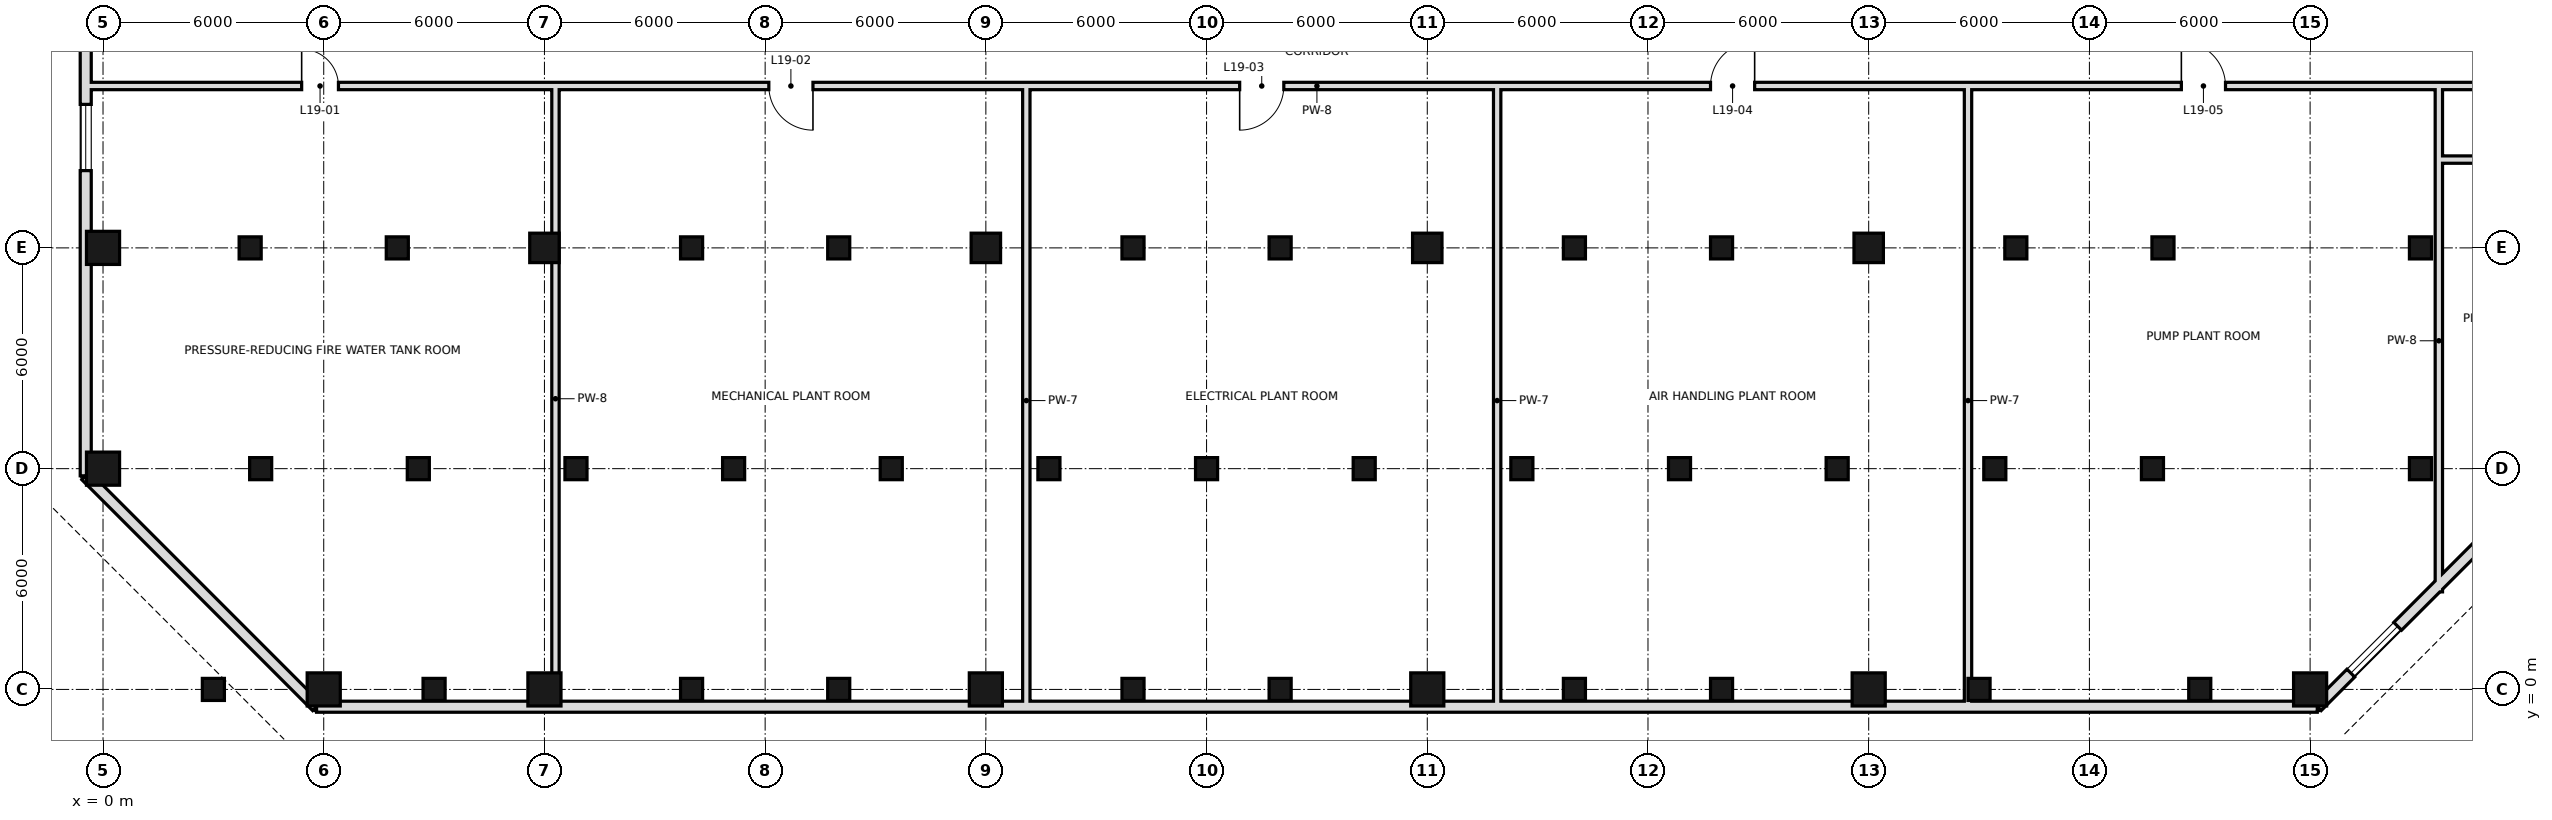
"""IFC4 building model, lengths in metres.
Left out: names, types, materials, properties, quantities, classifications, styles, units other than length and angle.
Written with IfcOpenShell. Run it as: python <this file> out.ifc"""

import sys

from ifc_helpers import new_model, si_unit, direction, frame, frame_2d, origin, origin_2d, place, context, subcontext, project, spatial, rectangle, hollow_rectangle, extrude, element, fill, save


model = new_model("IFC4")
c1 = context("Model", 3, precision=1e-05, world=origin(), true_north=direction((0.0, 1.0)))
c2 = subcontext(c1, "Body", "Model", "MODEL_VIEW")
j1 = project(units=[si_unit("LENGTHUNIT", "METRE"), si_unit("PLANEANGLEUNIT", "RADIAN")], contexts=[c1])
p1 = place(None, origin())
s1 = spatial("IfcSite", under=j1, at=p1, CompositionType="ELEMENT")
p2 = place(p1, origin())
s2 = spatial("IfcBuilding", under=s1, at=p2, CompositionType="ELEMENT")
p3 = place(p2, frame((0.0, 0.0, 90.2)))
s3 = spatial("IfcBuildingStorey", under=s2, at=p3, CompositionType="ELEMENT", Elevation=90.2)
p4 = place(p3, frame((0.0, 6.0, 0.0), z_axis=(0.0, 0.0, 1.0), x_axis=(1.0, 0.0, 0.0)))
e1 = element("IfcColumn", 1, at=p4, inside=s3, PredefinedType="COLUMN", context=c2, shape_type="SweptSolid", body=[
    extrude(hollow_rectangle(XDim=0.9, YDim=0.9, WallThickness=0.045, at=origin_2d()), origin(), (0.0, 0.0, 1.0), 5.7),
])
for number, where, z_axis, x_axis in (
    (2, (0.0, 12.0, 0.0), (0.0, 0.0, 1.0), (1.0, 0.0, 0.0)),
    (3, (6.0, 0.0, 0.0), (0.0, 0.0, 1.0), (1.0, 0.0, 0.0)),
    (4, (12.0, 0.0, 0.0), (0.0, 0.0, 1.0), (1.0, 0.0, 0.0)),
):
    element("IfcColumn", number, at=place(p3, frame(where, z_axis=z_axis, x_axis=x_axis)), inside=s3, PredefinedType="COLUMN", context=c2, shape_type="SweptSolid", body=[
        extrude(hollow_rectangle(XDim=0.9, YDim=0.9, WallThickness=0.045, at=origin_2d()), origin(), (0.0, 0.0, 1.0), 6.0),
    ])
p5 = place(p3, frame((12.0, 12.0, 0.0), z_axis=(0.0, 0.0, 1.0), x_axis=(1.0, 0.0, 0.0)))
e5 = element("IfcColumn", 5, at=p5, inside=s3, PredefinedType="COLUMN", context=c2, shape_type="SweptSolid", body=[
    extrude(hollow_rectangle(XDim=0.8, YDim=0.8, WallThickness=0.04, at=origin_2d()), origin(), (0.0, 0.0, 1.0), 6.0),
])
p6 = place(p3, frame((24.0, 0.0, 0.0), z_axis=(0.0, 0.0, 1.0), x_axis=(1.0, 0.0, 0.0)))
e6 = element("IfcColumn", 6, at=p6, inside=s3, PredefinedType="COLUMN", context=c2, shape_type="SweptSolid", body=[
    extrude(hollow_rectangle(XDim=0.9, YDim=0.9, WallThickness=0.045, at=origin_2d()), origin(), (0.0, 0.0, 1.0), 6.0),
])
p7 = place(p3, frame((24.0, 12.0, 0.0), z_axis=(0.0, 0.0, 1.0), x_axis=(1.0, 0.0, 0.0)))
e7 = element("IfcColumn", 7, at=p7, inside=s3, PredefinedType="COLUMN", context=c2, shape_type="SweptSolid", body=[
    extrude(hollow_rectangle(XDim=0.8, YDim=0.8, WallThickness=0.04, at=origin_2d()), origin(), (0.0, 0.0, 1.0), 6.0),
])
p8 = place(p3, frame((36.0, 0.0, 0.0), z_axis=(0.0, 0.0, 1.0), x_axis=(1.0, 0.0, 0.0)))
e8 = element("IfcColumn", 8, at=p8, inside=s3, PredefinedType="COLUMN", context=c2, shape_type="SweptSolid", body=[
    extrude(hollow_rectangle(XDim=0.9, YDim=0.9, WallThickness=0.045, at=origin_2d()), origin(), (0.0, 0.0, 1.0), 6.0),
])
p9 = place(p3, frame((36.0, 12.0, 0.0), z_axis=(0.0, 0.0, 1.0), x_axis=(1.0, 0.0, 0.0)))
e9 = element("IfcColumn", 9, at=p9, inside=s3, PredefinedType="COLUMN", context=c2, shape_type="SweptSolid", body=[
    extrude(hollow_rectangle(XDim=0.8, YDim=0.8, WallThickness=0.04, at=origin_2d()), origin(), (0.0, 0.0, 1.0), 6.0),
])
p10 = place(p3, frame((48.0, 0.0, 0.0), z_axis=(0.0, 0.0, 1.0), x_axis=(1.0, 0.0, 0.0)))
e10 = element("IfcColumn", 10, at=p10, inside=s3, PredefinedType="COLUMN", context=c2, shape_type="SweptSolid", body=[
    extrude(hollow_rectangle(XDim=0.9, YDim=0.9, WallThickness=0.045, at=origin_2d()), origin(), (0.0, 0.0, 1.0), 6.0),
])
p11 = place(p3, frame((48.0, 12.0, 0.0), z_axis=(0.0, 0.0, 1.0), x_axis=(1.0, 0.0, 0.0)))
e11 = element("IfcColumn", 11, at=p11, inside=s3, PredefinedType="COLUMN", context=c2, shape_type="SweptSolid", body=[
    extrude(hollow_rectangle(XDim=0.8, YDim=0.8, WallThickness=0.04, at=origin_2d()), origin(), (0.0, 0.0, 1.0), 6.0),
])
p12 = place(p3, frame((60.0, 0.0, 0.0), z_axis=(0.0, 0.0, 1.0), x_axis=(1.0, 0.0, 0.0)))
e12 = element("IfcColumn", 12, at=p12, inside=s3, PredefinedType="COLUMN", context=c2, shape_type="SweptSolid", body=[
    extrude(hollow_rectangle(XDim=0.9, YDim=0.9, WallThickness=0.045, at=origin_2d()), origin(), (0.0, 0.0, 1.0), 6.0),
])
for number, where, z_axis, x_axis in (
    (13, (3.0, 0.0, 1.2), (0.0, 0.0, 1.0), (1.0, 0.0, 0.0)),
    (14, (9.0, 0.0, 1.2), (0.0, 0.0, 1.0), (1.0, 0.0, 0.0)),
    (15, (16.0, 0.0, 1.2), (0.0, 0.0, 1.0), (1.0, 0.0, 0.0)),
    (16, (20.0, 0.0, 1.2), (0.0, 0.0, 1.0), (1.0, 0.0, 0.0)),
    (17, (28.0, 0.0, 1.2), (0.0, 0.0, 1.0), (1.0, 0.0, 0.0)),
    (18, (32.0, 0.0, 1.2), (0.0, 0.0, 1.0), (1.0, 0.0, 0.0)),
    (19, (40.0, 0.0, 1.2), (0.0, 0.0, 1.0), (1.0, 0.0, 0.0)),
    (20, (44.0, 0.0, 1.2), (0.0, 0.0, 1.0), (1.0, 0.0, 0.0)),
    (21, (51.0, 0.0, 1.2), (0.0, 0.0, 1.0), (1.0, 0.0, 0.0)),
    (22, (57.0, 0.0, 1.2), (0.0, 0.0, 1.0), (1.0, 0.0, 0.0)),
    (23, (4.286, 6.0, 1.2), (0.0, 0.0, 1.0), (1.0, 0.0, 0.0)),
    (24, (8.572, 6.0, 1.2), (0.0, 0.0, 1.0), (1.0, 0.0, 0.0)),
    (25, (12.857, 6.0, 1.2), (0.0, 0.0, 1.0), (1.0, 0.0, 0.0)),
    (26, (17.143, 6.0, 1.2), (0.0, 0.0, 1.0), (1.0, 0.0, 0.0)),
    (27, (21.428, 6.0, 1.2), (0.0, 0.0, 1.0), (1.0, 0.0, 0.0)),
    (28, (25.714, 6.0, 1.2), (0.0, 0.0, 1.0), (1.0, 0.0, 0.0)),
    (29, (30.0, 6.0, 1.2), (0.0, 0.0, 1.0), (1.0, 0.0, 0.0)),
    (30, (34.286, 6.0, 1.2), (0.0, 0.0, 1.0), (1.0, 0.0, 0.0)),
    (31, (38.572, 6.0, 1.2), (0.0, 0.0, 1.0), (1.0, 0.0, 0.0)),
    (32, (42.857, 6.0, 1.2), (0.0, 0.0, 1.0), (1.0, 0.0, 0.0)),
    (33, (47.143, 6.0, 1.2), (0.0, 0.0, 1.0), (1.0, 0.0, 0.0)),
    (34, (51.428, 6.0, 1.2), (0.0, 0.0, 1.0), (1.0, 0.0, 0.0)),
    (35, (55.714, 6.0, 1.2), (0.0, 0.0, 1.0), (1.0, 0.0, 0.0)),
    (36, (63.0, 6.0, 1.2), (0.0, 0.0, 1.0), (1.0, 0.0, 0.0)),
    (37, (4.0, 12.0, 1.2), (0.0, 0.0, 1.0), (1.0, 0.0, 0.0)),
    (38, (8.0, 12.0, 1.2), (0.0, 0.0, 1.0), (1.0, 0.0, 0.0)),
    (39, (16.0, 12.0, 1.2), (0.0, 0.0, 1.0), (1.0, 0.0, 0.0)),
    (40, (20.0, 12.0, 1.2), (0.0, 0.0, 1.0), (1.0, 0.0, 0.0)),
    (41, (28.0, 12.0, 1.2), (0.0, 0.0, 1.0), (1.0, 0.0, 0.0)),
    (42, (32.0, 12.0, 1.2), (0.0, 0.0, 1.0), (1.0, 0.0, 0.0)),
    (43, (40.0, 12.0, 1.2), (0.0, 0.0, 1.0), (1.0, 0.0, 0.0)),
    (44, (44.0, 12.0, 1.2), (0.0, 0.0, 1.0), (1.0, 0.0, 0.0)),
    (45, (52.0, 12.0, 1.2), (0.0, 0.0, 1.0), (1.0, 0.0, 0.0)),
    (46, (56.0, 12.0, 1.2), (0.0, 0.0, 1.0), (1.0, 0.0, 0.0)),
    (47, (63.0, 12.0, 1.2), (0.0, 0.0, 1.0), (1.0, 0.0, 0.0)),
):
    element("IfcColumn", number, at=place(p3, frame(where, z_axis=z_axis, x_axis=x_axis)), inside=s3, PredefinedType="COLUMN", context=c2, shape_type="SweptSolid", body=[
        extrude(hollow_rectangle(XDim=0.6, YDim=0.6, WallThickness=0.04, at=origin_2d()), origin(), (0.0, 0.0, 1.0), 3.3),
    ])
p13 = place(p3, frame((5.805, -0.47, 0.0), z_axis=(0.0, 0.0, 1.0), x_axis=(1.0, 0.0, 0.0)))
e48 = element("IfcWall", 48, at=p13, inside=s3, PredefinedType="SOLIDWALL", context=c2, shape_type="SweptSolid", body=[
    extrude(rectangle(XDim=54.389, YDim=0.3, at=frame_2d((27.195, 0.0))), origin(), (0.0, 0.0, 1.0), 5.7),
])
p14 = place(p3, frame((60.195, -0.47, 0.0), z_axis=(0.0, 0.0, 1.0), x_axis=(0.707106781187, 0.707106781187, 0.0)))
e49 = element("IfcWall", 49, at=p14, inside=s3, PredefinedType="SOLIDWALL", context=c2, shape_type="SweptSolid", body=[
    extrude(rectangle(XDim=8.875, YDim=0.3, at=frame_2d((4.438, 0.0))), origin(), (0.0, 0.0, 1.0), 5.7),
])
p15 = place(p14, frame((1.292, 0.0, 0.9)))
e50 = element("IfcOpeningElement", 50, at=p15, cuts=e49, PredefinedType="OPENING", context=c2, shape_type="SweptSolid", body=[
    extrude(rectangle(XDim=1.8, YDim=1.5, at=frame_2d((0.9, 0.75))), frame((0.0, 0.16, 0.0), z_axis=(0.0, -1.0, 0.0), x_axis=(1.0, 0.0, 0.0)), (0.0, 0.0, 1.0), 0.32),
])
p16 = place(p3, frame((-0.47, 42.195, 0.0), z_axis=(0.0, 0.0, 1.0), x_axis=(0.0, -1.0, 0.0)))
e51 = element("IfcWall", 51, at=p16, inside=s3, PredefinedType="SOLIDWALL", context=c2, shape_type="SweptSolid", body=[
    extrude(rectangle(XDim=36.389, YDim=0.3, at=frame_2d((18.195, 0.0))), origin(), (0.0, 0.0, 1.0), 5.7),
])
p17 = place(p16, frame((2.17, 0.0, 0.9)))
e52 = element("IfcOpeningElement", 52, at=p17, cuts=e51, PredefinedType="OPENING", context=c2, shape_type="SweptSolid", body=[
    extrude(rectangle(XDim=1.8, YDim=1.5, at=frame_2d((0.9, 0.75))), frame((0.0, 0.16, 0.0), z_axis=(0.0, -1.0, 0.0), x_axis=(1.0, 0.0, 0.0)), (0.0, 0.0, 1.0), 0.32),
])
p18 = place(p16, frame((14.295, 0.0, 0.9)))
e53 = element("IfcOpeningElement", 53, at=p18, cuts=e51, PredefinedType="OPENING", context=c2, shape_type="SweptSolid", body=[
    extrude(rectangle(XDim=1.8, YDim=1.5, at=frame_2d((0.9, 0.75))), frame((0.0, 0.16, 0.0), z_axis=(0.0, -1.0, 0.0), x_axis=(1.0, 0.0, 0.0)), (0.0, 0.0, 1.0), 0.32),
])
p19 = place(p16, frame((26.295, 0.0, 0.9)))
e54 = element("IfcOpeningElement", 54, at=p19, cuts=e51, PredefinedType="OPENING", context=c2, shape_type="SweptSolid", body=[
    extrude(rectangle(XDim=1.8, YDim=1.5, at=frame_2d((0.9, 0.75))), frame((0.0, 0.16, 0.0), z_axis=(0.0, -1.0, 0.0), x_axis=(1.0, 0.0, 0.0)), (0.0, 0.0, 1.0), 0.32),
])
p20 = place(p3, frame((-0.47, 5.805, 0.0), z_axis=(0.0, 0.0, 1.0), x_axis=(0.707106781187, -0.707106781187, 0.0)))
e55 = element("IfcWall", 55, at=p20, inside=s3, PredefinedType="SOLIDWALL", context=c2, shape_type="SweptSolid", body=[
    extrude(rectangle(XDim=8.875, YDim=0.3, at=frame_2d((4.438, 0.0))), origin(), (0.0, 0.0, 1.0), 5.7),
])
p21 = place(p3, frame((12.3, -0.5, 0.0), z_axis=(0.0, 0.0, 1.0), x_axis=(0.0, 1.0, 0.0)))
e56 = element("IfcWall", 56, at=p21, inside=s3, PredefinedType="SOLIDWALL", context=c2, shape_type="SweptSolid", body=[
    extrude(rectangle(XDim=16.8, YDim=0.2, at=frame_2d((8.4, 0.0))), origin(), (0.0, 0.0, 1.0), 5.7),
])
for number, where, z_axis, x_axis in (
    (57, (25.1, -0.6, 0.0), (0.0, 0.0, 1.0), (0.0, 1.0, 0.0)),
    (58, (37.9, -0.6, 0.0), (0.0, 0.0, 1.0), (0.0, 1.0, 0.0)),
    (59, (50.7, -0.6, 0.0), (0.0, 0.0, 1.0), (0.0, 1.0, 0.0)),
):
    element("IfcWall", number, at=place(p3, frame(where, z_axis=z_axis, x_axis=x_axis)), inside=s3, PredefinedType="SOLIDWALL", context=c2, shape_type="SweptSolid", body=[
        extrude(rectangle(XDim=16.9, YDim=0.2, at=frame_2d((8.45, 0.0))), origin(), (0.0, 0.0, 1.0), 5.7),
    ])
p22 = place(p3, frame((63.5, 2.651, 0.0), z_axis=(0.0, 0.0, 1.0), x_axis=(0.0, 1.0, 0.0)))
e60 = element("IfcWall", 60, at=p22, inside=s3, PredefinedType="SOLIDWALL", context=c2, shape_type="SweptSolid", body=[
    extrude(rectangle(XDim=13.649, YDim=0.2, at=frame_2d((6.825, 0.0))), origin(), (0.0, 0.0, 1.0), 5.7),
])
p23 = place(p3, frame((63.6, 14.4, 0.0), z_axis=(0.0, 0.0, 1.0), x_axis=(1.0, 0.0, 0.0)))
e61 = element("IfcWall", 61, at=p23, inside=s3, PredefinedType="SOLIDWALL", context=c2, shape_type="SweptSolid", body=[
    extrude(rectangle(XDim=3.0, YDim=0.2, at=frame_2d((1.5, 0.0))), origin(), (0.0, 0.0, 1.0), 5.7),
])
p24 = place(p23, frame((0.9, 0.0, 0.0)))
e62 = element("IfcOpeningElement", 62, at=p24, cuts=e61, PredefinedType="OPENING", context=c2, shape_type="SweptSolid", body=[
    extrude(rectangle(XDim=1.0, YDim=2.4, at=frame_2d((0.5, 1.2))), frame((0.0, 0.11, 0.0), z_axis=(0.0, -1.0, 0.0), x_axis=(1.0, 0.0, 0.0)), (0.0, 0.0, 1.0), 0.22),
])
p25 = place(p3, frame((-0.6, 16.4, 0.0), z_axis=(0.0, 0.0, 1.0), x_axis=(1.0, 0.0, 0.0)))
e63 = element("IfcWall", 63, at=p25, inside=s3, PredefinedType="SOLIDWALL", context=c2, shape_type="SweptSolid", body=[
    extrude(rectangle(XDim=67.2, YDim=0.2, at=frame_2d((33.6, 0.0))), origin(), (0.0, 0.0, 1.0), 5.0),
])
p26 = place(p25, frame((6.0, 0.0, 0.0)))
e64 = element("IfcOpeningElement", 64, at=p26, cuts=e63, PredefinedType="OPENING", context=c2, shape_type="SweptSolid", body=[
    extrude(rectangle(XDim=1.0, YDim=2.4, at=frame_2d((0.5, 1.2))), frame((0.0, 0.11, 0.0), z_axis=(0.0, -1.0, 0.0), x_axis=(1.0, 0.0, 0.0)), (0.0, 0.0, 1.0), 0.22),
])
p27 = place(p25, frame((18.7, 0.0, 0.0)))
e65 = element("IfcOpeningElement", 65, at=p27, cuts=e63, PredefinedType="OPENING", context=c2, shape_type="SweptSolid", body=[
    extrude(rectangle(XDim=1.2, YDim=2.4, at=frame_2d((0.6, 1.2))), frame((0.0, 0.11, 0.0), z_axis=(0.0, -1.0, 0.0), x_axis=(1.0, 0.0, 0.0)), (0.0, 0.0, 1.0), 0.22),
])
p28 = place(p25, frame((31.5, 0.0, 0.0)))
e66 = element("IfcOpeningElement", 66, at=p28, cuts=e63, PredefinedType="OPENING", context=c2, shape_type="SweptSolid", body=[
    extrude(rectangle(XDim=1.2, YDim=2.4, at=frame_2d((0.6, 1.2))), frame((0.0, 0.11, 0.0), z_axis=(0.0, -1.0, 0.0), x_axis=(1.0, 0.0, 0.0)), (0.0, 0.0, 1.0), 0.22),
])
p29 = place(p25, frame((44.3, 0.0, 0.0)))
e67 = element("IfcOpeningElement", 67, at=p29, cuts=e63, PredefinedType="OPENING", context=c2, shape_type="SweptSolid", body=[
    extrude(rectangle(XDim=1.2, YDim=2.4, at=frame_2d((0.6, 1.2))), frame((0.0, 0.11, 0.0), z_axis=(0.0, -1.0, 0.0), x_axis=(1.0, 0.0, 0.0)), (0.0, 0.0, 1.0), 0.22),
])
p30 = place(p25, frame((57.1, 0.0, 0.0)))
e68 = element("IfcOpeningElement", 68, at=p30, cuts=e63, PredefinedType="OPENING", context=c2, shape_type="SweptSolid", body=[
    extrude(rectangle(XDim=1.2, YDim=2.4, at=frame_2d((0.6, 1.2))), frame((0.0, 0.11, 0.0), z_axis=(0.0, -1.0, 0.0), x_axis=(1.0, 0.0, 0.0)), (0.0, 0.0, 1.0), 0.22),
])
p31 = place(p25, frame((65.1, 0.0, 0.0)))
e69 = element("IfcOpeningElement", 69, at=p31, cuts=e63, PredefinedType="OPENING", context=c2, shape_type="SweptSolid", body=[
    extrude(rectangle(XDim=1.0, YDim=2.4, at=frame_2d((0.5, 1.2))), frame((0.0, 0.11, 0.0), z_axis=(0.0, -1.0, 0.0), x_axis=(1.0, 0.0, 0.0)), (0.0, 0.0, 1.0), 0.22),
])
p32 = place(p15, origin())
e70 = element("IfcWindow", 70, at=p32, inside=s3, PartitioningType="SINGLE_PANEL", PredefinedType="WINDOW", context=c2, shape_type="SweptSolid", body=[
    extrude(rectangle(XDim=1.8, YDim=1.5, at=frame_2d((0.9, 0.75))), frame((0.0, 0.03, 0.0), z_axis=(0.0, -1.0, 0.0), x_axis=(1.0, 0.0, 0.0)), (0.0, 0.0, 1.0), 0.06),
])
fill(e50, e70)
p33 = place(p19, origin())
e71 = element("IfcWindow", 71, at=p33, inside=s3, PartitioningType="SINGLE_PANEL", PredefinedType="WINDOW", context=c2, shape_type="SweptSolid", body=[
    extrude(rectangle(XDim=1.8, YDim=1.5, at=frame_2d((0.9, 0.75))), frame((0.0, 0.03, 0.0), z_axis=(0.0, -1.0, 0.0), x_axis=(1.0, 0.0, 0.0)), (0.0, 0.0, 1.0), 0.06),
])
fill(e54, e71)
p34 = place(p26, origin())
e72 = element("IfcDoor", 72, at=p34, inside=s3, OperationType="SINGLE_SWING_LEFT", PredefinedType="DOOR", context=c2, shape_type="SweptSolid", body=[
    extrude(rectangle(XDim=1.0, YDim=2.4, at=frame_2d((0.5, 1.2))), frame((0.0, 0.025, 0.0), z_axis=(0.0, -1.0, 0.0), x_axis=(1.0, 0.0, 0.0)), (0.0, 0.0, 1.0), 0.05),
])
fill(e64, e72)
p35 = place(p27, origin())
e73 = element("IfcDoor", 73, at=p35, inside=s3, OperationType="SINGLE_SWING_RIGHT", PredefinedType="DOOR", context=c2, shape_type="SweptSolid", body=[
    extrude(rectangle(XDim=1.2, YDim=2.4, at=frame_2d((0.6, 1.2))), frame((0.0, 0.025, 0.0), z_axis=(0.0, -1.0, 0.0), x_axis=(1.0, 0.0, 0.0)), (0.0, 0.0, 1.0), 0.05),
])
fill(e65, e73)
p36 = place(p28, frame((1.2, 0.0, 0.0), z_axis=(0.0, 0.0, 1.0), x_axis=(-1.0, 0.0, 0.0)))
e74 = element("IfcDoor", 74, at=p36, inside=s3, OperationType="SINGLE_SWING_RIGHT", PredefinedType="DOOR", context=c2, shape_type="SweptSolid", body=[
    extrude(rectangle(XDim=1.2, YDim=2.4, at=frame_2d((0.6, 1.2))), frame((0.0, 0.025, 0.0), z_axis=(0.0, -1.0, 0.0), x_axis=(1.0, 0.0, 0.0)), (0.0, 0.0, 1.0), 0.05),
])
fill(e66, e74)
p37 = place(p29, frame((1.2, 0.0, 0.0), z_axis=(0.0, 0.0, 1.0), x_axis=(-1.0, 0.0, 0.0)))
e75 = element("IfcDoor", 75, at=p37, inside=s3, OperationType="SINGLE_SWING_LEFT", PredefinedType="DOOR", context=c2, shape_type="SweptSolid", body=[
    extrude(rectangle(XDim=1.2, YDim=2.4, at=frame_2d((0.6, 1.2))), frame((0.0, 0.025, 0.0), z_axis=(0.0, -1.0, 0.0), x_axis=(1.0, 0.0, 0.0)), (0.0, 0.0, 1.0), 0.05),
])
fill(e67, e75)
p38 = place(p30, origin())
e76 = element("IfcDoor", 76, at=p38, inside=s3, OperationType="SINGLE_SWING_LEFT", PredefinedType="DOOR", context=c2, shape_type="SweptSolid", body=[
    extrude(rectangle(XDim=1.2, YDim=2.4, at=frame_2d((0.6, 1.2))), frame((0.0, 0.025, 0.0), z_axis=(0.0, -1.0, 0.0), x_axis=(1.0, 0.0, 0.0)), (0.0, 0.0, 1.0), 0.05),
])
fill(e68, e76)
save(model, sys.argv[1])
